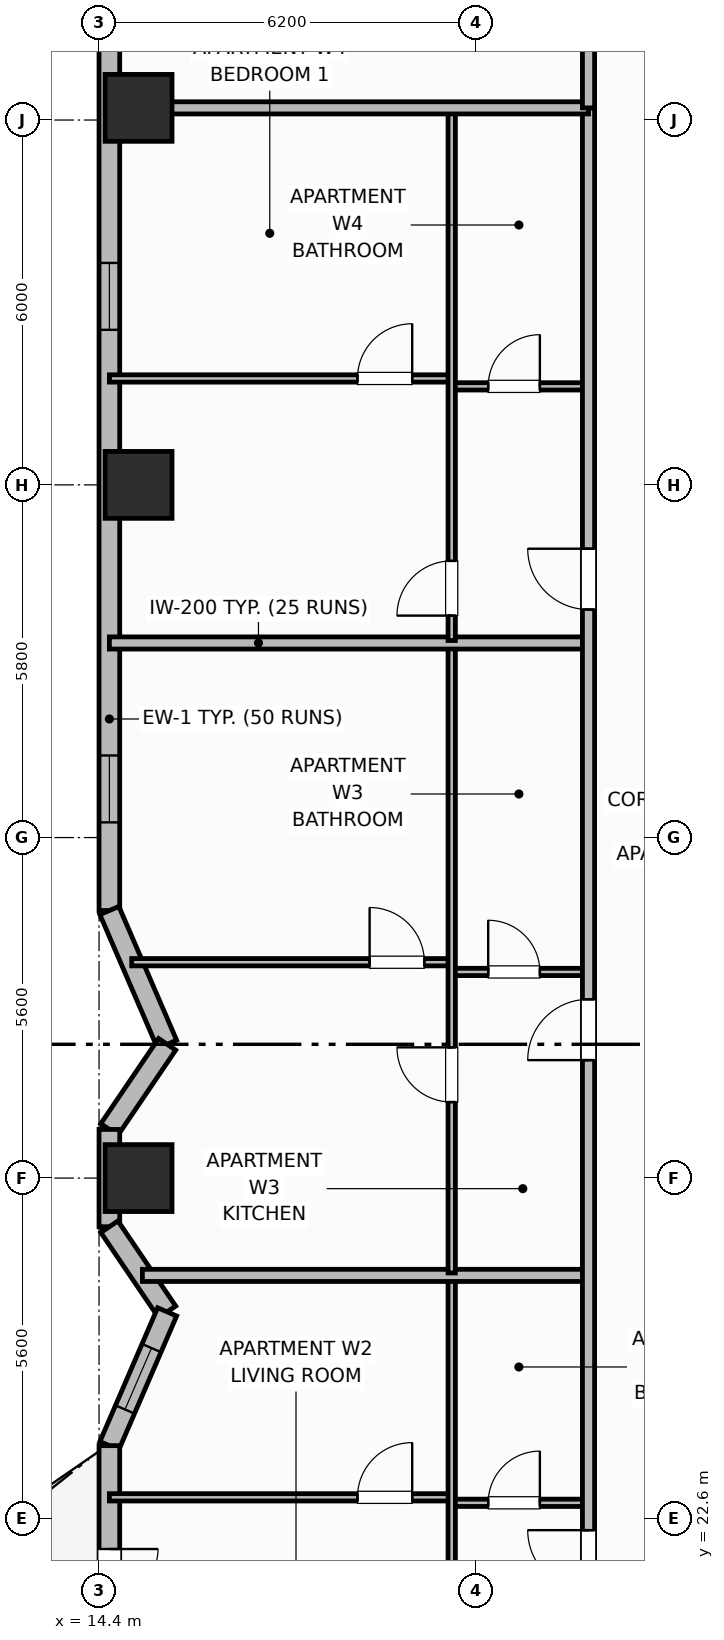
"""IFC4 building model, lengths in metres.
Left out: names, types, materials, properties, quantities, classifications, styles, units other than length and angle.
Written with IfcOpenShell. Run it as: python <this file> out.ifc"""

import sys

from ifc_helpers import new_model, si_unit, direction, frame, frame_2d, origin, origin_2d, place, context, subcontext, project, spatial, rectangle, extrude, element, fill, save


model = new_model("IFC4")
c1 = context("Model", 3, precision=1e-05, world=origin(), true_north=direction((0.0, 1.0)))
c2 = subcontext(c1, "Body", "Model", "MODEL_VIEW")
j1 = project(units=[si_unit("LENGTHUNIT", "METRE"), si_unit("PLANEANGLEUNIT", "RADIAN")], contexts=[c1])
p1 = place(None, origin())
s1 = spatial("IfcSite", under=j1, at=p1, CompositionType="ELEMENT")
p2 = place(p1, origin())
s2 = spatial("IfcBuilding", under=s1, at=p2, CompositionType="ELEMENT")
p3 = place(p2, frame((0.0, 0.0, 99.4)))
s3 = spatial("IfcBuildingStorey", under=s2, at=p3, CompositionType="ELEMENT", Elevation=99.4)
for number, where, z_axis, x_axis in (
    (1, (15.05, 28.2, 0.0), (0.0, 0.0, 1.0), (1.0, 0.0, 0.0)),
    (2, (15.05, 39.6, 0.0), (0.0, 0.0, 1.0), (1.0, 0.0, 0.0)),
    (3, (15.05, 45.8, 0.0), (0.0, 0.0, 1.0), (1.0, 0.0, 0.0)),
):
    element("IfcColumn", number, at=place(p3, frame(where, z_axis=z_axis, x_axis=x_axis)), inside=s3, PredefinedType="COLUMN", context=c2, shape_type="SweptSolid", body=[
        extrude(rectangle(XDim=1.1, YDim=1.1, at=origin_2d()), origin(), (0.0, 0.0, 1.0), 3.7),
    ])
p4 = place(p3, frame((14.57, 47.4, 0.0), z_axis=(0.0, 0.0, 1.0), x_axis=(0.0, -1.0, 0.0)))
e4 = element("IfcWall", 4, at=p4, inside=s3, PredefinedType="SOLIDWALL", context=c2, shape_type="SweptSolid", body=[
    extrude(rectangle(XDim=14.8, YDim=0.34, at=frame_2d((7.4, 0.0))), origin(), (0.0, 0.0, 1.0), 2.7),
])
p5 = place(p4, frame((4.15, 0.0, 0.93)))
e5 = element("IfcOpeningElement", 5, at=p5, cuts=e4, PredefinedType="OPENING", context=c2, shape_type="SweptSolid", body=[
    extrude(rectangle(XDim=1.1, YDim=1.65, at=frame_2d((0.55, 0.825))), frame((0.0, 0.18, 0.0), z_axis=(0.0, -1.0, 0.0), x_axis=(1.0, 0.0, 0.0)), (0.0, 0.0, 1.0), 0.36),
])
p6 = place(p4, frame((12.25, 0.0, 0.93)))
e6 = element("IfcOpeningElement", 6, at=p6, cuts=e4, PredefinedType="OPENING", context=c2, shape_type="SweptSolid", body=[
    extrude(rectangle(XDim=1.1, YDim=1.65, at=frame_2d((0.55, 0.825))), frame((0.0, 0.18, 0.0), z_axis=(0.0, -1.0, 0.0), x_axis=(1.0, 0.0, 0.0)), (0.0, 0.0, 1.0), 0.36),
])
p7 = place(p3, frame((14.57, 32.6, 0.0), z_axis=(0.0, 0.0, 1.0), x_axis=(0.396389181543, -0.918082576218, 0.0)))
e7 = element("IfcWall", 7, at=p7, inside=s3, PredefinedType="SOLIDWALL", context=c2, shape_type="SweptSolid", body=[
    extrude(rectangle(XDim=2.396, YDim=0.34, at=frame_2d((1.198, 0.0))), origin(), (0.0, 0.0, 1.0), 2.7),
])
p8 = place(p3, frame((15.52, 30.4, 0.0), z_axis=(0.0, 0.0, 1.0), x_axis=(-0.561508476251, -0.827470985049, 0.0)))
e8 = element("IfcWall", 8, at=p8, inside=s3, PredefinedType="SOLIDWALL", context=c2, shape_type="SweptSolid", body=[
    extrude(rectangle(XDim=1.692, YDim=0.34, at=frame_2d((0.846, 0.0))), origin(), (0.0, 0.0, 1.0), 2.7),
])
p9 = place(p3, frame((14.57, 29.0, 0.0), z_axis=(0.0, 0.0, 1.0), x_axis=(0.0, -1.0, 0.0)))
e9 = element("IfcWall", 9, at=p9, inside=s3, PredefinedType="SOLIDWALL", context=c2, shape_type="SweptSolid", body=[
    extrude(rectangle(XDim=1.6, YDim=0.34, at=frame_2d((0.8, 0.0))), origin(), (0.0, 0.0, 1.0), 2.7),
])
p10 = place(p3, frame((14.57, 27.4, 0.0), z_axis=(0.0, 0.0, 1.0), x_axis=(0.561508476251, -0.827470985049, 0.0)))
e10 = element("IfcWall", 10, at=p10, inside=s3, PredefinedType="SOLIDWALL", context=c2, shape_type="SweptSolid", body=[
    extrude(rectangle(XDim=1.692, YDim=0.34, at=frame_2d((0.846, 0.0))), origin(), (0.0, 0.0, 1.0), 2.7),
])
p11 = place(p3, frame((15.52, 26.0, 0.0), z_axis=(0.0, 0.0, 1.0), x_axis=(-0.396426258231, -0.918066567186, 0.0)))
e11 = element("IfcWall", 11, at=p11, inside=s3, PredefinedType="SOLIDWALL", context=c2, shape_type="SweptSolid", body=[
    extrude(rectangle(XDim=2.396, YDim=0.34, at=frame_2d((1.198, 0.0))), origin(), (0.0, 0.0, 1.0), 2.7),
])
p12 = place(p11, frame((0.648, 0.0, 0.89)))
e12 = element("IfcOpeningElement", 12, at=p12, cuts=e11, PredefinedType="OPENING", context=c2, shape_type="SweptSolid", body=[
    extrude(rectangle(XDim=1.1, YDim=1.65, at=frame_2d((0.55, 0.825))), frame((0.0, 0.18, 0.0), z_axis=(0.0, -1.0, 0.0), x_axis=(1.0, 0.0, 0.0)), (0.0, 0.0, 1.0), 0.36),
])
p13 = place(p3, frame((14.57, 23.8, 0.0), z_axis=(0.0, 0.0, 1.0), x_axis=(0.0, -1.0, 0.0)))
e13 = element("IfcWall", 13, at=p13, inside=s3, PredefinedType="SOLIDWALL", context=c2, shape_type="SweptSolid", body=[
    extrude(rectangle(XDim=14.8, YDim=0.34, at=frame_2d((7.4, 0.0))), origin(), (0.0, 0.0, 1.0), 2.7),
])
p14 = place(p13, frame((1.7, 0.0, 0.0)))
e14 = element("IfcOpeningElement", 14, at=p14, cuts=e13, PredefinedType="OPENING", context=c2, shape_type="SweptSolid", body=[
    extrude(rectangle(XDim=1.6, YDim=2.1, at=frame_2d((0.8, 1.05))), frame((0.0, 0.18, 0.0), z_axis=(0.0, -1.0, 0.0), x_axis=(1.0, 0.0, 0.0)), (0.0, 0.0, 1.0), 0.36),
])
p15 = place(p13, frame((4.96, 0.0, 0.69)))
e15 = element("IfcOpeningElement", 15, at=p15, cuts=e13, PredefinedType="OPENING", context=c2, shape_type="SweptSolid", body=[
    extrude(rectangle(XDim=1.4, YDim=1.85, at=frame_2d((0.7, 0.925))), frame((0.0, 0.18, 0.0), z_axis=(0.0, -1.0, 0.0), x_axis=(1.0, 0.0, 0.0)), (0.0, 0.0, 1.0), 0.36),
])
p16 = place(p13, frame((9.8, 0.0, 0.68)))
e16 = element("IfcOpeningElement", 16, at=p16, cuts=e13, PredefinedType="OPENING", context=c2, shape_type="SweptSolid", body=[
    extrude(rectangle(XDim=2.1, YDim=1.9, at=frame_2d((1.05, 0.95))), frame((0.0, 0.18, 0.0), z_axis=(0.0, -1.0, 0.0), x_axis=(1.0, 0.0, 0.0)), (0.0, 0.0, 1.0), 0.36),
])
p17 = place(p3, frame((20.2, 22.86, 0.0), z_axis=(0.0, 0.0, 1.0), x_axis=(1.0, 0.0, 0.0)))
e17 = element("IfcWall", 17, at=p17, inside=s3, PredefinedType="PARTITIONING", context=c2, shape_type="SweptSolid", body=[
    extrude(rectangle(XDim=2.25, YDim=0.12, at=frame_2d((1.125, 0.0))), origin(), (0.0, 0.0, 1.0), 2.53),
])
p18 = place(p17, frame((0.6, 0.0, 0.0)))
e18 = element("IfcOpeningElement", 18, at=p18, cuts=e17, PredefinedType="OPENING", context=c2, shape_type="SweptSolid", body=[
    extrude(rectangle(XDim=0.85, YDim=2.1, at=frame_2d((0.425, 1.05))), frame((0.0, 0.07, 0.0), z_axis=(0.0, -1.0, 0.0), x_axis=(1.0, 0.0, 0.0)), (0.0, 0.0, 1.0), 0.14),
])
p19 = place(p3, frame((14.57, 22.95, 0.0), z_axis=(0.0, 0.0, 1.0), x_axis=(1.0, 0.0, 0.0)))
e19 = element("IfcWall", 19, at=p19, inside=s3, PredefinedType="PARTITIONING", context=c2, shape_type="SweptSolid", body=[
    extrude(rectangle(XDim=5.63, YDim=0.12, at=frame_2d((2.815, 0.0))), origin(), (0.0, 0.0, 1.0), 2.53),
])
p20 = place(p19, frame((4.08, 0.0, 0.0)))
e20 = element("IfcOpeningElement", 20, at=p20, cuts=e19, PredefinedType="OPENING", context=c2, shape_type="SweptSolid", body=[
    extrude(rectangle(XDim=0.9, YDim=2.1, at=frame_2d((0.45, 1.05))), frame((0.0, 0.07, 0.0), z_axis=(0.0, -1.0, 0.0), x_axis=(1.0, 0.0, 0.0)), (0.0, 0.0, 1.0), 0.14),
])
p21 = place(p3, frame((20.2, 19.44, 0.0), z_axis=(0.0, 0.0, 1.0), x_axis=(0.0, 1.0, 0.0)))
e21 = element("IfcWall", 21, at=p21, inside=s3, PredefinedType="PARTITIONING", context=c2, shape_type="SweptSolid", body=[
    extrude(rectangle(XDim=7.12, YDim=0.12, at=frame_2d((3.56, 0.0))), origin(), (0.0, 0.0, 1.0), 2.53),
])
p22 = place(p21, frame((0.41, 0.0, 0.0)))
e22 = element("IfcOpeningElement", 22, at=p22, cuts=e21, PredefinedType="OPENING", context=c2, shape_type="SweptSolid", body=[
    extrude(rectangle(XDim=0.9, YDim=2.1, at=frame_2d((0.45, 1.05))), frame((0.0, 0.07, 0.0), z_axis=(0.0, -1.0, 0.0), x_axis=(1.0, 0.0, 0.0)), (0.0, 0.0, 1.0), 0.14),
])
p23 = place(p3, frame((15.113, 26.6, 0.0), z_axis=(0.0, 0.0, 1.0), x_axis=(1.0, 0.0, 0.0)))
e23 = element("IfcWall", 23, at=p23, inside=s3, PredefinedType="PARTITIONING", context=c2, shape_type="SweptSolid", body=[
    extrude(rectangle(XDim=7.337, YDim=0.2, at=frame_2d((3.668, 0.0))), origin(), (0.0, 0.0, 1.0), 2.53),
])
p24 = place(p3, frame((20.2, 31.59, 0.0), z_axis=(0.0, 0.0, 1.0), x_axis=(1.0, 0.0, 0.0)))
e24 = element("IfcWall", 24, at=p24, inside=s3, PredefinedType="PARTITIONING", context=c2, shape_type="SweptSolid", body=[
    extrude(rectangle(XDim=2.25, YDim=0.12, at=frame_2d((1.125, 0.0))), origin(), (0.0, 0.0, 1.0), 2.53),
])
p25 = place(p24, frame((0.6, 0.0, 0.0)))
e25 = element("IfcOpeningElement", 25, at=p25, cuts=e24, PredefinedType="OPENING", context=c2, shape_type="SweptSolid", body=[
    extrude(rectangle(XDim=0.85, YDim=2.1, at=frame_2d((0.425, 1.05))), frame((0.0, 0.07, 0.0), z_axis=(0.0, -1.0, 0.0), x_axis=(1.0, 0.0, 0.0)), (0.0, 0.0, 1.0), 0.14),
])
p26 = place(p3, frame((14.937, 31.75, 0.0), z_axis=(0.0, 0.0, 1.0), x_axis=(1.0, 0.0, 0.0)))
e26 = element("IfcWall", 26, at=p26, inside=s3, PredefinedType="PARTITIONING", context=c2, shape_type="SweptSolid", body=[
    extrude(rectangle(XDim=5.263, YDim=0.12, at=frame_2d((2.631, 0.0))), origin(), (0.0, 0.0, 1.0), 2.53),
])
p27 = place(p26, frame((3.913, 0.0, 0.0)))
e27 = element("IfcOpeningElement", 27, at=p27, cuts=e26, PredefinedType="OPENING", context=c2, shape_type="SweptSolid", body=[
    extrude(rectangle(XDim=0.9, YDim=2.1, at=frame_2d((0.45, 1.05))), frame((0.0, 0.07, 0.0), z_axis=(0.0, -1.0, 0.0), x_axis=(1.0, 0.0, 0.0)), (0.0, 0.0, 1.0), 0.14),
])
p28 = place(p3, frame((20.2, 26.64, 0.0), z_axis=(0.0, 0.0, 1.0), x_axis=(0.0, 1.0, 0.0)))
e28 = element("IfcWall", 28, at=p28, inside=s3, PredefinedType="PARTITIONING", context=c2, shape_type="SweptSolid", body=[
    extrude(rectangle(XDim=10.32, YDim=0.12, at=frame_2d((5.16, 0.0))), origin(), (0.0, 0.0, 1.0), 2.53),
])
p29 = place(p28, frame((2.81, 0.0, 0.0)))
e29 = element("IfcOpeningElement", 29, at=p29, cuts=e28, PredefinedType="OPENING", context=c2, shape_type="SweptSolid", body=[
    extrude(rectangle(XDim=0.9, YDim=2.1, at=frame_2d((0.45, 1.05))), frame((0.0, 0.07, 0.0), z_axis=(0.0, -1.0, 0.0), x_axis=(1.0, 0.0, 0.0)), (0.0, 0.0, 1.0), 0.14),
])
p30 = place(p3, frame((14.57, 37.0, 0.0), z_axis=(0.0, 0.0, 1.0), x_axis=(1.0, 0.0, 0.0)))
e30 = element("IfcWall", 30, at=p30, inside=s3, PredefinedType="PARTITIONING", context=c2, shape_type="SweptSolid", body=[
    extrude(rectangle(XDim=7.88, YDim=0.2, at=frame_2d((3.94, 0.0))), origin(), (0.0, 0.0, 1.0), 2.53),
])
p31 = place(p3, frame((20.2, 41.22, 0.0), z_axis=(0.0, 0.0, 1.0), x_axis=(1.0, 0.0, 0.0)))
e31 = element("IfcWall", 31, at=p31, inside=s3, PredefinedType="PARTITIONING", context=c2, shape_type="SweptSolid", body=[
    extrude(rectangle(XDim=2.25, YDim=0.12, at=frame_2d((1.125, 0.0))), origin(), (0.0, 0.0, 1.0), 2.53),
])
p32 = place(p31, frame((0.6, 0.0, 0.0)))
e32 = element("IfcOpeningElement", 32, at=p32, cuts=e31, PredefinedType="OPENING", context=c2, shape_type="SweptSolid", body=[
    extrude(rectangle(XDim=0.85, YDim=2.1, at=frame_2d((0.425, 1.05))), frame((0.0, 0.07, 0.0), z_axis=(0.0, -1.0, 0.0), x_axis=(1.0, 0.0, 0.0)), (0.0, 0.0, 1.0), 0.14),
])
p33 = place(p3, frame((14.57, 41.35, 0.0), z_axis=(0.0, 0.0, 1.0), x_axis=(1.0, 0.0, 0.0)))
e33 = element("IfcWall", 33, at=p33, inside=s3, PredefinedType="PARTITIONING", context=c2, shape_type="SweptSolid", body=[
    extrude(rectangle(XDim=5.63, YDim=0.12, at=frame_2d((2.815, 0.0))), origin(), (0.0, 0.0, 1.0), 2.53),
])
p34 = place(p33, frame((4.08, 0.0, 0.0)))
e34 = element("IfcOpeningElement", 34, at=p34, cuts=e33, PredefinedType="OPENING", context=c2, shape_type="SweptSolid", body=[
    extrude(rectangle(XDim=0.9, YDim=2.1, at=frame_2d((0.45, 1.05))), frame((0.0, 0.07, 0.0), z_axis=(0.0, -1.0, 0.0), x_axis=(1.0, 0.0, 0.0)), (0.0, 0.0, 1.0), 0.14),
])
p35 = place(p3, frame((20.2, 37.04, 0.0), z_axis=(0.0, 0.0, 1.0), x_axis=(0.0, 1.0, 0.0)))
e35 = element("IfcWall", 35, at=p35, inside=s3, PredefinedType="PARTITIONING", context=c2, shape_type="SweptSolid", body=[
    extrude(rectangle(XDim=8.72, YDim=0.12, at=frame_2d((4.36, 0.0))), origin(), (0.0, 0.0, 1.0), 2.53),
])
p36 = place(p35, frame((0.41, 0.0, 0.0)))
e36 = element("IfcOpeningElement", 36, at=p36, cuts=e35, PredefinedType="OPENING", context=c2, shape_type="SweptSolid", body=[
    extrude(rectangle(XDim=0.9, YDim=2.1, at=frame_2d((0.45, 1.05))), frame((0.0, 0.07, 0.0), z_axis=(0.0, -1.0, 0.0), x_axis=(1.0, 0.0, 0.0)), (0.0, 0.0, 1.0), 0.14),
])
p37 = place(p3, frame((22.45, 10.6, 0.0), z_axis=(0.0, 0.0, 1.0), x_axis=(0.0, 1.0, 0.0)))
e37 = element("IfcWall", 37, at=p37, inside=s3, PredefinedType="PARTITIONING", context=c2, shape_type="SweptSolid", body=[
    extrude(rectangle(XDim=35.2, YDim=0.2, at=frame_2d((17.6, 0.0))), origin(), (0.0, 0.0, 1.0), 2.53),
])
p38 = place(p37, frame((2.65, 0.0, 0.0)))
e38 = element("IfcOpeningElement", 38, at=p38, cuts=e37, PredefinedType="OPENING", context=c2, shape_type="SweptSolid", body=[
    extrude(rectangle(XDim=1.0, YDim=2.15, at=frame_2d((0.5, 1.075))), frame((0.0, 0.11, 0.0), z_axis=(0.0, -1.0, 0.0), x_axis=(1.0, 0.0, 0.0)), (0.0, 0.0, 1.0), 0.22),
])
p39 = place(p37, frame((10.81, 0.0, 0.0)))
e39 = element("IfcOpeningElement", 39, at=p39, cuts=e37, PredefinedType="OPENING", context=c2, shape_type="SweptSolid", body=[
    extrude(rectangle(XDim=1.0, YDim=2.15, at=frame_2d((0.5, 1.075))), frame((0.0, 0.11, 0.0), z_axis=(0.0, -1.0, 0.0), x_axis=(1.0, 0.0, 0.0)), (0.0, 0.0, 1.0), 0.22),
])
p40 = place(p37, frame((19.54, 0.0, 0.0)))
e40 = element("IfcOpeningElement", 40, at=p40, cuts=e37, PredefinedType="OPENING", context=c2, shape_type="SweptSolid", body=[
    extrude(rectangle(XDim=1.0, YDim=2.15, at=frame_2d((0.5, 1.075))), frame((0.0, 0.11, 0.0), z_axis=(0.0, -1.0, 0.0), x_axis=(1.0, 0.0, 0.0)), (0.0, 0.0, 1.0), 0.22),
])
p41 = place(p37, frame((26.95, 0.0, 0.0)))
e41 = element("IfcOpeningElement", 41, at=p41, cuts=e37, PredefinedType="OPENING", context=c2, shape_type="SweptSolid", body=[
    extrude(rectangle(XDim=1.0, YDim=2.15, at=frame_2d((0.5, 1.075))), frame((0.0, 0.11, 0.0), z_axis=(0.0, -1.0, 0.0), x_axis=(1.0, 0.0, 0.0)), (0.0, 0.0, 1.0), 0.22),
])
p42 = place(p3, frame((14.99, 45.8, 0.0), z_axis=(0.0, 0.0, 1.0), x_axis=(1.0, 0.0, 0.0)))
e42 = element("IfcWall", 42, at=p42, inside=s3, PredefinedType="PARTITIONING", context=c2, shape_type="SweptSolid", body=[
    extrude(rectangle(XDim=7.46, YDim=0.2, at=frame_2d((3.73, 0.0))), origin(), (0.0, 0.0, 1.0), 2.53),
])
p43 = place(p3, frame((22.45, 45.8, 0.0), z_axis=(0.0, 0.0, 1.0), x_axis=(0.0, 1.0, 0.0)))
e43 = element("IfcWall", 43, at=p43, inside=s3, PredefinedType="PARTITIONING", context=c2, shape_type="SweptSolid", body=[
    extrude(rectangle(XDim=5.63, YDim=0.2, at=frame_2d((2.815, 0.0))), origin(), (0.0, 0.0, 1.0), 2.53),
])
p44 = place(p5, origin())
e44 = element("IfcWindow", 44, at=p44, inside=s3, PartitioningType="SINGLE_PANEL", PredefinedType="WINDOW", context=c2, shape_type="SweptSolid", body=[
    extrude(rectangle(XDim=1.1, YDim=1.65, at=frame_2d((0.55, 0.825))), frame((0.0, 0.03, 0.0), z_axis=(0.0, -1.0, 0.0), x_axis=(1.0, 0.0, 0.0)), (0.0, 0.0, 1.0), 0.06),
])
fill(e5, e44)
p45 = place(p6, origin())
e45 = element("IfcWindow", 45, at=p45, inside=s3, PartitioningType="SINGLE_PANEL", PredefinedType="WINDOW", context=c2, shape_type="SweptSolid", body=[
    extrude(rectangle(XDim=1.1, YDim=1.65, at=frame_2d((0.55, 0.825))), frame((0.0, 0.03, 0.0), z_axis=(0.0, -1.0, 0.0), x_axis=(1.0, 0.0, 0.0)), (0.0, 0.0, 1.0), 0.06),
])
fill(e6, e45)
p46 = place(p12, origin())
e46 = element("IfcWindow", 46, at=p46, inside=s3, PartitioningType="SINGLE_PANEL", PredefinedType="WINDOW", context=c2, shape_type="SweptSolid", body=[
    extrude(rectangle(XDim=1.1, YDim=1.65, at=frame_2d((0.55, 0.825))), frame((0.0, 0.03, 0.0), z_axis=(0.0, -1.0, 0.0), x_axis=(1.0, 0.0, 0.0)), (0.0, 0.0, 1.0), 0.06),
])
fill(e12, e46)
p47 = place(p14, origin())
e47 = element("IfcDoor", 47, at=p47, inside=s3, OperationType="DOUBLE_DOOR_SINGLE_SWING", PredefinedType="DOOR", context=c2, shape_type="SweptSolid", body=[
    extrude(rectangle(XDim=1.6, YDim=2.1, at=frame_2d((0.8, 1.05))), frame((0.0, 0.025, 0.0), z_axis=(0.0, -1.0, 0.0), x_axis=(1.0, 0.0, 0.0)), (0.0, 0.0, 1.0), 0.05),
])
fill(e14, e47)
p48 = place(p18, origin())
e48 = element("IfcDoor", 48, at=p48, inside=s3, OperationType="SINGLE_SWING_RIGHT", PredefinedType="DOOR", context=c2, shape_type="SweptSolid", body=[
    extrude(rectangle(XDim=0.85, YDim=2.1, at=frame_2d((0.425, 1.05))), frame((0.0, 0.025, 0.0), z_axis=(0.0, -1.0, 0.0), x_axis=(1.0, 0.0, 0.0)), (0.0, 0.0, 1.0), 0.05),
])
fill(e18, e48)
p49 = place(p20, origin())
e49 = element("IfcDoor", 49, at=p49, inside=s3, OperationType="SINGLE_SWING_RIGHT", PredefinedType="DOOR", context=c2, shape_type="SweptSolid", body=[
    extrude(rectangle(XDim=0.9, YDim=2.1, at=frame_2d((0.45, 1.05))), frame((0.0, 0.025, 0.0), z_axis=(0.0, -1.0, 0.0), x_axis=(1.0, 0.0, 0.0)), (0.0, 0.0, 1.0), 0.05),
])
fill(e20, e49)
p50 = place(p25, origin())
e50 = element("IfcDoor", 50, at=p50, inside=s3, OperationType="SINGLE_SWING_LEFT", PredefinedType="DOOR", context=c2, shape_type="SweptSolid", body=[
    extrude(rectangle(XDim=0.85, YDim=2.1, at=frame_2d((0.425, 1.05))), frame((0.0, 0.025, 0.0), z_axis=(0.0, -1.0, 0.0), x_axis=(1.0, 0.0, 0.0)), (0.0, 0.0, 1.0), 0.05),
])
fill(e25, e50)
p51 = place(p27, origin())
e51 = element("IfcDoor", 51, at=p51, inside=s3, OperationType="SINGLE_SWING_LEFT", PredefinedType="DOOR", context=c2, shape_type="SweptSolid", body=[
    extrude(rectangle(XDim=0.9, YDim=2.1, at=frame_2d((0.45, 1.05))), frame((0.0, 0.025, 0.0), z_axis=(0.0, -1.0, 0.0), x_axis=(1.0, 0.0, 0.0)), (0.0, 0.0, 1.0), 0.05),
])
fill(e27, e51)
p52 = place(p29, origin())
e52 = element("IfcDoor", 52, at=p52, inside=s3, OperationType="SINGLE_SWING_RIGHT", PredefinedType="DOOR", context=c2, shape_type="SweptSolid", body=[
    extrude(rectangle(XDim=0.9, YDim=2.1, at=frame_2d((0.45, 1.05))), frame((0.0, 0.025, 0.0), z_axis=(0.0, -1.0, 0.0), x_axis=(1.0, 0.0, 0.0)), (0.0, 0.0, 1.0), 0.05),
])
fill(e29, e52)
p53 = place(p32, origin())
e53 = element("IfcDoor", 53, at=p53, inside=s3, OperationType="SINGLE_SWING_RIGHT", PredefinedType="DOOR", context=c2, shape_type="SweptSolid", body=[
    extrude(rectangle(XDim=0.85, YDim=2.1, at=frame_2d((0.425, 1.05))), frame((0.0, 0.025, 0.0), z_axis=(0.0, -1.0, 0.0), x_axis=(1.0, 0.0, 0.0)), (0.0, 0.0, 1.0), 0.05),
])
fill(e32, e53)
p54 = place(p34, origin())
e54 = element("IfcDoor", 54, at=p54, inside=s3, OperationType="SINGLE_SWING_RIGHT", PredefinedType="DOOR", context=c2, shape_type="SweptSolid", body=[
    extrude(rectangle(XDim=0.9, YDim=2.1, at=frame_2d((0.45, 1.05))), frame((0.0, 0.025, 0.0), z_axis=(0.0, -1.0, 0.0), x_axis=(1.0, 0.0, 0.0)), (0.0, 0.0, 1.0), 0.05),
])
fill(e34, e54)
p55 = place(p36, origin())
e55 = element("IfcDoor", 55, at=p55, inside=s3, OperationType="SINGLE_SWING_LEFT", PredefinedType="DOOR", context=c2, shape_type="SweptSolid", body=[
    extrude(rectangle(XDim=0.9, YDim=2.1, at=frame_2d((0.45, 1.05))), frame((0.0, 0.025, 0.0), z_axis=(0.0, -1.0, 0.0), x_axis=(1.0, 0.0, 0.0)), (0.0, 0.0, 1.0), 0.05),
])
fill(e36, e55)
p56 = place(p39, origin())
e56 = element("IfcDoor", 56, at=p56, inside=s3, OperationType="SINGLE_SWING_RIGHT", PredefinedType="DOOR", context=c2, shape_type="SweptSolid", body=[
    extrude(rectangle(XDim=1.0, YDim=2.15, at=frame_2d((0.5, 1.075))), frame((0.0, 0.025, 0.0), z_axis=(0.0, -1.0, 0.0), x_axis=(1.0, 0.0, 0.0)), (0.0, 0.0, 1.0), 0.05),
])
fill(e39, e56)
p57 = place(p40, origin())
e57 = element("IfcDoor", 57, at=p57, inside=s3, OperationType="SINGLE_SWING_LEFT", PredefinedType="DOOR", context=c2, shape_type="SweptSolid", body=[
    extrude(rectangle(XDim=1.0, YDim=2.15, at=frame_2d((0.5, 1.075))), frame((0.0, 0.025, 0.0), z_axis=(0.0, -1.0, 0.0), x_axis=(1.0, 0.0, 0.0)), (0.0, 0.0, 1.0), 0.05),
])
fill(e40, e57)
p58 = place(p41, origin())
e58 = element("IfcDoor", 58, at=p58, inside=s3, OperationType="SINGLE_SWING_RIGHT", PredefinedType="DOOR", context=c2, shape_type="SweptSolid", body=[
    extrude(rectangle(XDim=1.0, YDim=2.15, at=frame_2d((0.5, 1.075))), frame((0.0, 0.025, 0.0), z_axis=(0.0, -1.0, 0.0), x_axis=(1.0, 0.0, 0.0)), (0.0, 0.0, 1.0), 0.05),
])
fill(e41, e58)
save(model, sys.argv[1])
